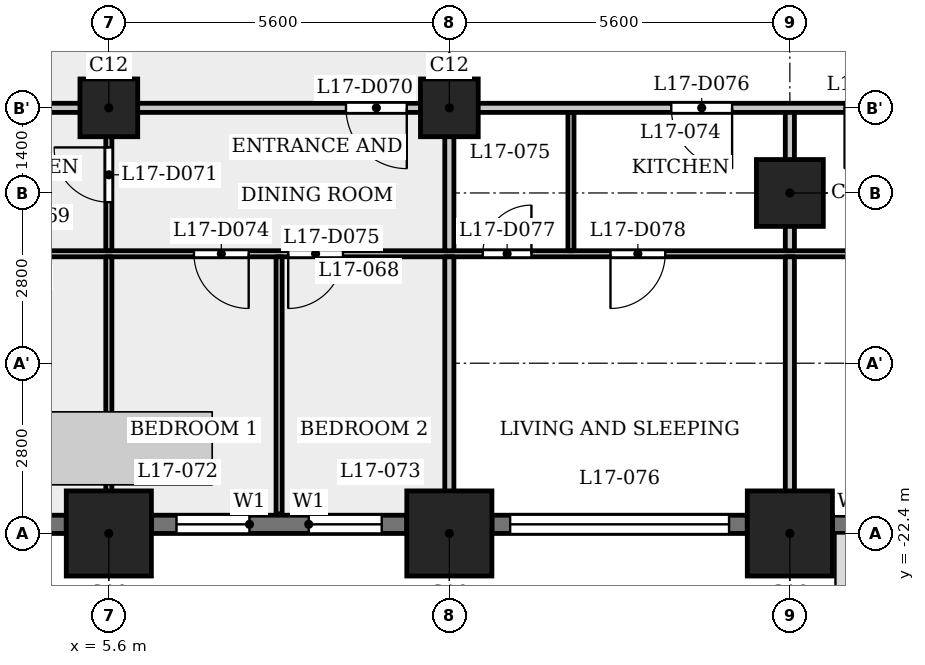
"""IFC4 building model, lengths in metres.
Left out: names, types, materials, properties, quantities, classifications, styles, units other than length and angle.
Written with IfcOpenShell. Run it as: python <this file> out.ifc"""

import sys

from ifc_helpers import new_model, si_unit, direction, frame, frame_2d, origin, origin_2d, place, context, subcontext, project, spatial, rectangle, extrude, element, fill, save


model = new_model("IFC4")
c1 = context("Model", 3, precision=1e-05, world=origin(), true_north=direction((0.0, 1.0)))
c2 = subcontext(c1, "Body", "Model", "MODEL_VIEW")
j1 = project(units=[si_unit("LENGTHUNIT", "METRE"), si_unit("PLANEANGLEUNIT", "RADIAN")], contexts=[c1])
p1 = place(None, origin())
s1 = spatial("IfcSite", under=j1, at=p1, CompositionType="ELEMENT")
p2 = place(p1, origin())
s2 = spatial("IfcBuilding", under=s1, at=p2, CompositionType="ELEMENT")
p3 = place(p2, frame((0.0, 0.0, 69.0)))
s3 = spatial("IfcBuildingStorey", under=s2, at=p3, CompositionType="ELEMENT", Elevation=69.0)
for number, where, z_axis, x_axis in (
    (1, (5.6, -22.4, 0.0), (0.0, 0.0, 1.0), (1.0, 0.0, 0.0)),
    (2, (11.2, -22.4, 0.0), (0.0, 0.0, 1.0), (1.0, 0.0, 0.0)),
    (3, (16.8, -22.4, 0.0), (0.0, 0.0, 1.0), (1.0, 0.0, 0.0)),
):
    element("IfcColumn", number, at=place(p3, frame(where, z_axis=z_axis, x_axis=x_axis)), inside=s3, PredefinedType="COLUMN", context=c2, shape_type="SweptSolid", body=[
        extrude(rectangle(XDim=1.4, YDim=1.4, at=origin_2d()), origin(), (0.0, 0.0, 1.0), 3.5),
    ])
p4 = place(p3, frame((16.8, -16.8, 0.0), z_axis=(0.0, 0.0, 1.0), x_axis=(1.0, 0.0, 0.0)))
e4 = element("IfcColumn", 4, at=p4, inside=s3, PredefinedType="COLUMN", context=c2, shape_type="SweptSolid", body=[
    extrude(rectangle(XDim=1.1, YDim=1.1, at=origin_2d()), origin(), (0.0, 0.0, 1.0), 3.5),
])
for number, where, z_axis, x_axis in (
    (5, (5.6, -15.4, 0.0), (0.0, 0.0, 1.0), (1.0, 0.0, 0.0)),
    (6, (11.2, -15.4, 0.0), (0.0, 0.0, 1.0), (1.0, 0.0, 0.0)),
):
    element("IfcColumn", number, at=place(p3, frame(where, z_axis=z_axis, x_axis=x_axis)), inside=s3, PredefinedType="COLUMN", context=c2, shape_type="SweptSolid", body=[
        extrude(rectangle(XDim=0.95, YDim=0.95, at=origin_2d()), origin(), (0.0, 0.0, 1.0), 3.5),
    ])
p5 = place(p3, frame((0.7, -22.25, 0.0), z_axis=(0.0, 0.0, 1.0), x_axis=(1.0, 0.0, 0.0)))
e7 = element("IfcWall", 7, at=p5, inside=s3, PredefinedType="SOLIDWALL", context=c2, shape_type="SweptSolid", body=[
    extrude(rectangle(XDim=4.2, YDim=0.3, at=frame_2d((2.1, 0.0))), origin(), (0.0, 0.0, 1.0), 2.3),
])
p6 = place(p5, frame((0.3, 0.0, 1.2)))
e8 = element("IfcOpeningElement", 8, at=p6, cuts=e7, PredefinedType="OPENING", context=c2, shape_type="SweptSolid", body=[
    extrude(rectangle(XDim=3.6, YDim=0.95, at=frame_2d((1.8, 0.475))), frame((0.0, 0.16, 0.0), z_axis=(0.0, -1.0, 0.0), x_axis=(1.0, 0.0, 0.0)), (0.0, 0.0, 1.0), 0.32),
])
p7 = place(p3, frame((6.3, -22.25, 0.0), z_axis=(0.0, 0.0, 1.0), x_axis=(1.0, 0.0, 0.0)))
e9 = element("IfcWall", 9, at=p7, inside=s3, PredefinedType="SOLIDWALL", context=c2, shape_type="SweptSolid", body=[
    extrude(rectangle(XDim=4.2, YDim=0.3, at=frame_2d((2.1, 0.0))), origin(), (0.0, 0.0, 1.0), 2.3),
])
p8 = place(p7, frame((0.413, 0.0, 0.6)))
e10 = element("IfcOpeningElement", 10, at=p8, cuts=e9, PredefinedType="OPENING", context=c2, shape_type="SweptSolid", body=[
    extrude(rectangle(XDim=1.2, YDim=1.55, at=frame_2d((0.6, 0.775))), frame((0.0, 0.16, 0.0), z_axis=(0.0, -1.0, 0.0), x_axis=(1.0, 0.0, 0.0)), (0.0, 0.0, 1.0), 0.32),
])
p9 = place(p7, frame((2.587, 0.0, 0.6)))
e11 = element("IfcOpeningElement", 11, at=p9, cuts=e9, PredefinedType="OPENING", context=c2, shape_type="SweptSolid", body=[
    extrude(rectangle(XDim=1.2, YDim=1.55, at=frame_2d((0.6, 0.775))), frame((0.0, 0.16, 0.0), z_axis=(0.0, -1.0, 0.0), x_axis=(1.0, 0.0, 0.0)), (0.0, 0.0, 1.0), 0.32),
])
p10 = place(p3, frame((11.9, -22.25, 0.0), z_axis=(0.0, 0.0, 1.0), x_axis=(1.0, 0.0, 0.0)))
e12 = element("IfcWall", 12, at=p10, inside=s3, PredefinedType="SOLIDWALL", context=c2, shape_type="SweptSolid", body=[
    extrude(rectangle(XDim=4.2, YDim=0.3, at=frame_2d((2.1, 0.0))), origin(), (0.0, 0.0, 1.0), 2.3),
])
p11 = place(p10, frame((0.3, 0.0, 1.2)))
e13 = element("IfcOpeningElement", 13, at=p11, cuts=e12, PredefinedType="OPENING", context=c2, shape_type="SweptSolid", body=[
    extrude(rectangle(XDim=3.6, YDim=0.95, at=frame_2d((1.8, 0.475))), frame((0.0, 0.16, 0.0), z_axis=(0.0, -1.0, 0.0), x_axis=(1.0, 0.0, 0.0)), (0.0, 0.0, 1.0), 0.32),
])
p12 = place(p3, frame((17.5, -22.25, 0.0), z_axis=(0.0, 0.0, 1.0), x_axis=(1.0, 0.0, 0.0)))
e14 = element("IfcWall", 14, at=p12, inside=s3, PredefinedType="SOLIDWALL", context=c2, shape_type="SweptSolid", body=[
    extrude(rectangle(XDim=2.5, YDim=0.3, at=frame_2d((1.25, 0.0))), origin(), (0.0, 0.0, 1.0), 2.3),
])
p13 = place(p12, frame((0.35, 0.0, 0.9)))
e15 = element("IfcOpeningElement", 15, at=p13, cuts=e14, PredefinedType="OPENING", context=c2, shape_type="SweptSolid", body=[
    extrude(rectangle(XDim=1.8, YDim=1.25, at=frame_2d((0.9, 0.625))), frame((0.0, 0.16, 0.0), z_axis=(0.0, -1.0, 0.0), x_axis=(1.0, 0.0, 0.0)), (0.0, 0.0, 1.0), 0.32),
])
p14 = place(p3, frame((-26.394, -17.8, 0.0), z_axis=(0.0, 0.0, 1.0), x_axis=(1.0, 0.0, 0.0)))
e16 = element("IfcWall", 16, at=p14, inside=s3, PredefinedType="PARTITIONING", context=c2, shape_type="SweptSolid", body=[
    extrude(rectangle(XDim=53.034, YDim=0.1, at=frame_2d((26.517, 0.0))), origin(), (0.0, 0.0, 1.0), 3.15),
])
p15 = place(p14, frame((0.794, 0.0, 0.0)))
e17 = element("IfcOpeningElement", 17, at=p15, cuts=e16, PredefinedType="OPENING", context=c2, shape_type="SweptSolid", body=[
    extrude(rectangle(XDim=0.8, YDim=2.1, at=frame_2d((0.4, 1.05))), frame((0.0, 0.06, 0.0), z_axis=(0.0, -1.0, 0.0), x_axis=(1.0, 0.0, 0.0)), (0.0, 0.0, 1.0), 0.12),
])
p16 = place(p14, frame((5.644, 0.0, 0.0)))
e18 = element("IfcOpeningElement", 18, at=p16, cuts=e16, PredefinedType="OPENING", context=c2, shape_type="SweptSolid", body=[
    extrude(rectangle(XDim=0.9, YDim=2.1, at=frame_2d((0.45, 1.05))), frame((0.0, 0.06, 0.0), z_axis=(0.0, -1.0, 0.0), x_axis=(1.0, 0.0, 0.0)), (0.0, 0.0, 1.0), 0.12),
])
p17 = place(p14, frame((10.494, 0.0, 0.0)))
e19 = element("IfcOpeningElement", 19, at=p17, cuts=e16, PredefinedType="OPENING", context=c2, shape_type="SweptSolid", body=[
    extrude(rectangle(XDim=0.8, YDim=2.1, at=frame_2d((0.4, 1.05))), frame((0.0, 0.06, 0.0), z_axis=(0.0, -1.0, 0.0), x_axis=(1.0, 0.0, 0.0)), (0.0, 0.0, 1.0), 0.12),
])
p18 = place(p14, frame((13.844, 0.0, 0.0)))
e20 = element("IfcOpeningElement", 20, at=p18, cuts=e16, PredefinedType="OPENING", context=c2, shape_type="SweptSolid", body=[
    extrude(rectangle(XDim=0.9, YDim=2.1, at=frame_2d((0.45, 1.05))), frame((0.0, 0.06, 0.0), z_axis=(0.0, -1.0, 0.0), x_axis=(1.0, 0.0, 0.0)), (0.0, 0.0, 1.0), 0.12),
])
p19 = place(p14, frame((19.344, 0.0, 0.0)))
e21 = element("IfcOpeningElement", 21, at=p19, cuts=e16, PredefinedType="OPENING", context=c2, shape_type="SweptSolid", body=[
    extrude(rectangle(XDim=0.8, YDim=2.1, at=frame_2d((0.4, 1.05))), frame((0.0, 0.06, 0.0), z_axis=(0.0, -1.0, 0.0), x_axis=(1.0, 0.0, 0.0)), (0.0, 0.0, 1.0), 0.12),
])
p20 = place(p14, frame((16.094, 0.0, 0.0)))
e22 = element("IfcOpeningElement", 22, at=p20, cuts=e16, PredefinedType="OPENING", context=c2, shape_type="SweptSolid", body=[
    extrude(rectangle(XDim=0.9, YDim=2.1, at=frame_2d((0.45, 1.05))), frame((0.0, 0.06, 0.0), z_axis=(0.0, -1.0, 0.0), x_axis=(1.0, 0.0, 0.0)), (0.0, 0.0, 1.0), 0.12),
])
p21 = place(p14, frame((24.944, 0.0, 0.0)))
e23 = element("IfcOpeningElement", 23, at=p21, cuts=e16, PredefinedType="OPENING", context=c2, shape_type="SweptSolid", body=[
    extrude(rectangle(XDim=0.8, YDim=2.1, at=frame_2d((0.4, 1.05))), frame((0.0, 0.06, 0.0), z_axis=(0.0, -1.0, 0.0), x_axis=(1.0, 0.0, 0.0)), (0.0, 0.0, 1.0), 0.12),
])
p22 = place(p14, frame((22.444, 0.0, 0.0)))
e24 = element("IfcOpeningElement", 24, at=p22, cuts=e16, PredefinedType="OPENING", context=c2, shape_type="SweptSolid", body=[
    extrude(rectangle(XDim=0.9, YDim=2.1, at=frame_2d((0.45, 1.05))), frame((0.0, 0.06, 0.0), z_axis=(0.0, -1.0, 0.0), x_axis=(1.0, 0.0, 0.0)), (0.0, 0.0, 1.0), 0.12),
])
p23 = place(p14, frame((26.944, 0.0, 0.0)))
e25 = element("IfcOpeningElement", 25, at=p23, cuts=e16, PredefinedType="OPENING", context=c2, shape_type="SweptSolid", body=[
    extrude(rectangle(XDim=0.8, YDim=2.1, at=frame_2d((0.4, 1.05))), frame((0.0, 0.06, 0.0), z_axis=(0.0, -1.0, 0.0), x_axis=(1.0, 0.0, 0.0)), (0.0, 0.0, 1.0), 0.12),
])
p24 = place(p14, frame((29.794, 0.0, 0.0)))
e26 = element("IfcOpeningElement", 26, at=p24, cuts=e16, PredefinedType="OPENING", context=c2, shape_type="SweptSolid", body=[
    extrude(rectangle(XDim=0.9, YDim=2.1, at=frame_2d((0.45, 1.05))), frame((0.0, 0.06, 0.0), z_axis=(0.0, -1.0, 0.0), x_axis=(1.0, 0.0, 0.0)), (0.0, 0.0, 1.0), 0.12),
])
p25 = place(p14, frame((33.394, 0.0, 0.0)))
e27 = element("IfcOpeningElement", 27, at=p25, cuts=e16, PredefinedType="OPENING", context=c2, shape_type="SweptSolid", body=[
    extrude(rectangle(XDim=0.9, YDim=2.1, at=frame_2d((0.45, 1.05))), frame((0.0, 0.06, 0.0), z_axis=(0.0, -1.0, 0.0), x_axis=(1.0, 0.0, 0.0)), (0.0, 0.0, 1.0), 0.12),
])
p26 = place(p14, frame((34.944, 0.0, 0.0)))
e28 = element("IfcOpeningElement", 28, at=p26, cuts=e16, PredefinedType="OPENING", context=c2, shape_type="SweptSolid", body=[
    extrude(rectangle(XDim=0.9, YDim=2.1, at=frame_2d((0.45, 1.05))), frame((0.0, 0.06, 0.0), z_axis=(0.0, -1.0, 0.0), x_axis=(1.0, 0.0, 0.0)), (0.0, 0.0, 1.0), 0.12),
])
p27 = place(p14, frame((38.144, 0.0, 0.0)))
e29 = element("IfcOpeningElement", 29, at=p27, cuts=e16, PredefinedType="OPENING", context=c2, shape_type="SweptSolid", body=[
    extrude(rectangle(XDim=0.8, YDim=2.1, at=frame_2d((0.4, 1.05))), frame((0.0, 0.06, 0.0), z_axis=(0.0, -1.0, 0.0), x_axis=(1.0, 0.0, 0.0)), (0.0, 0.0, 1.0), 0.12),
])
p28 = place(p14, frame((40.244, 0.0, 0.0)))
e30 = element("IfcOpeningElement", 30, at=p28, cuts=e16, PredefinedType="OPENING", context=c2, shape_type="SweptSolid", body=[
    extrude(rectangle(XDim=0.9, YDim=2.1, at=frame_2d((0.45, 1.05))), frame((0.0, 0.06, 0.0), z_axis=(0.0, -1.0, 0.0), x_axis=(1.0, 0.0, 0.0)), (0.0, 0.0, 1.0), 0.12),
])
p29 = place(p14, frame((49.362, 0.0, 0.0)))
e31 = element("IfcOpeningElement", 31, at=p29, cuts=e16, PredefinedType="OPENING", context=c2, shape_type="SweptSolid", body=[
    extrude(rectangle(XDim=0.8, YDim=2.1, at=frame_2d((0.4, 1.05))), frame((0.0, 0.06, 0.0), z_axis=(0.0, -1.0, 0.0), x_axis=(1.0, 0.0, 0.0)), (0.0, 0.0, 1.0), 0.12),
])
p30 = place(p14, frame((45.094, 0.0, 0.0)))
e32 = element("IfcOpeningElement", 32, at=p30, cuts=e16, PredefinedType="OPENING", context=c2, shape_type="SweptSolid", body=[
    extrude(rectangle(XDim=0.9, YDim=2.1, at=frame_2d((0.45, 1.05))), frame((0.0, 0.06, 0.0), z_axis=(0.0, -1.0, 0.0), x_axis=(1.0, 0.0, 0.0)), (0.0, 0.0, 1.0), 0.12),
])
p31 = place(p3, frame((-27.484, -15.4, 0.0), z_axis=(0.0, 0.0, 1.0), x_axis=(1.0, 0.0, 0.0)))
e33 = element("IfcWall", 33, at=p31, inside=s3, PredefinedType="PARTITIONING", context=c2, shape_type="SweptSolid", body=[
    extrude(rectangle(XDim=54.968, YDim=0.15, at=frame_2d((27.484, 0.0))), origin(), (0.0, 0.0, 1.0), 3.15),
])
p32 = place(p31, frame((5.734, 0.0, 0.0)))
e34 = element("IfcOpeningElement", 34, at=p32, cuts=e33, PredefinedType="OPENING", context=c2, shape_type="SweptSolid", body=[
    extrude(rectangle(XDim=1.0, YDim=2.1, at=frame_2d((0.5, 1.05))), frame((0.0, 0.085, 0.0), z_axis=(0.0, -1.0, 0.0), x_axis=(1.0, 0.0, 0.0)), (0.0, 0.0, 1.0), 0.17),
])
p33 = place(p31, frame((13.934, 0.0, 0.0)))
e35 = element("IfcOpeningElement", 35, at=p33, cuts=e33, PredefinedType="OPENING", context=c2, shape_type="SweptSolid", body=[
    extrude(rectangle(XDim=1.0, YDim=2.1, at=frame_2d((0.5, 1.05))), frame((0.0, 0.085, 0.0), z_axis=(0.0, -1.0, 0.0), x_axis=(1.0, 0.0, 0.0)), (0.0, 0.0, 1.0), 0.17),
])
p34 = place(p31, frame((18.184, 0.0, 0.0)))
e36 = element("IfcOpeningElement", 36, at=p34, cuts=e33, PredefinedType="OPENING", context=c2, shape_type="SweptSolid", body=[
    extrude(rectangle(XDim=1.0, YDim=2.1, at=frame_2d((0.5, 1.05))), frame((0.0, 0.085, 0.0), z_axis=(0.0, -1.0, 0.0), x_axis=(1.0, 0.0, 0.0)), (0.0, 0.0, 1.0), 0.17),
])
p35 = place(p31, frame((22.534, 0.0, 0.0)))
e37 = element("IfcOpeningElement", 37, at=p35, cuts=e33, PredefinedType="OPENING", context=c2, shape_type="SweptSolid", body=[
    extrude(rectangle(XDim=1.0, YDim=2.1, at=frame_2d((0.5, 1.05))), frame((0.0, 0.085, 0.0), z_axis=(0.0, -1.0, 0.0), x_axis=(1.0, 0.0, 0.0)), (0.0, 0.0, 1.0), 0.17),
])
p36 = place(p31, frame((36.984, 0.0, 0.0)))
e38 = element("IfcOpeningElement", 38, at=p36, cuts=e33, PredefinedType="OPENING", context=c2, shape_type="SweptSolid", body=[
    extrude(rectangle(XDim=1.0, YDim=2.1, at=frame_2d((0.5, 1.05))), frame((0.0, 0.085, 0.0), z_axis=(0.0, -1.0, 0.0), x_axis=(1.0, 0.0, 0.0)), (0.0, 0.0, 1.0), 0.17),
])
p37 = place(p31, frame((42.334, 0.0, 0.0)))
e39 = element("IfcOpeningElement", 39, at=p37, cuts=e33, PredefinedType="OPENING", context=c2, shape_type="SweptSolid", body=[
    extrude(rectangle(XDim=1.0, YDim=2.1, at=frame_2d((0.5, 1.05))), frame((0.0, 0.085, 0.0), z_axis=(0.0, -1.0, 0.0), x_axis=(1.0, 0.0, 0.0)), (0.0, 0.0, 1.0), 0.17),
])
p38 = place(p31, frame((45.184, 0.0, 0.0)))
e40 = element("IfcOpeningElement", 40, at=p38, cuts=e33, PredefinedType="OPENING", context=c2, shape_type="SweptSolid", body=[
    extrude(rectangle(XDim=1.0, YDim=2.1, at=frame_2d((0.5, 1.05))), frame((0.0, 0.085, 0.0), z_axis=(0.0, -1.0, 0.0), x_axis=(1.0, 0.0, 0.0)), (0.0, 0.0, 1.0), 0.17),
])
p39 = place(p3, frame((5.6, -23.08, 0.0), z_axis=(0.0, 0.0, 1.0), x_axis=(0.0, 1.0, 0.0)))
e41 = element("IfcWall", 41, at=p39, inside=s3, PredefinedType="PARTITIONING", context=c2, shape_type="SweptSolid", body=[
    extrude(rectangle(XDim=5.23, YDim=0.1, at=frame_2d((2.615, 0.0))), origin(), (0.0, 0.0, 1.0), 3.15),
])
p40 = place(p3, frame((5.6, -17.75, 0.0), z_axis=(0.0, 0.0, 1.0), x_axis=(0.0, 1.0, 0.0)))
e42 = element("IfcWall", 42, at=p40, inside=s3, PredefinedType="PARTITIONING", context=c2, shape_type="SweptSolid", body=[
    extrude(rectangle(XDim=2.275, YDim=0.1, at=frame_2d((1.137, 0.0))), origin(), (0.0, 0.0, 1.0), 3.15),
])
p41 = place(p40, frame((0.799, 0.0, 0.0)))
e43 = element("IfcOpeningElement", 43, at=p41, cuts=e42, PredefinedType="OPENING", context=c2, shape_type="SweptSolid", body=[
    extrude(rectangle(XDim=0.9, YDim=2.1, at=frame_2d((0.45, 1.05))), frame((0.0, 0.06, 0.0), z_axis=(0.0, -1.0, 0.0), x_axis=(1.0, 0.0, 0.0)), (0.0, 0.0, 1.0), 0.12),
])
p42 = place(p3, frame((8.4, -22.08, 0.0), z_axis=(0.0, 0.0, 1.0), x_axis=(0.0, 1.0, 0.0)))
e44 = element("IfcWall", 44, at=p42, inside=s3, PredefinedType="PARTITIONING", context=c2, shape_type="SweptSolid", body=[
    extrude(rectangle(XDim=4.23, YDim=0.1, at=frame_2d((2.115, 0.0))), origin(), (0.0, 0.0, 1.0), 3.15),
])
p43 = place(p3, frame((11.2, -23.08, 0.0), z_axis=(0.0, 0.0, 1.0), x_axis=(0.0, 1.0, 0.0)))
e45 = element("IfcWall", 45, at=p43, inside=s3, PredefinedType="PARTITIONING", context=c2, shape_type="SweptSolid", body=[
    extrude(rectangle(XDim=5.23, YDim=0.15, at=frame_2d((2.615, 0.0))), origin(), (0.0, 0.0, 1.0), 3.15),
])
p44 = place(p3, frame((11.2, -17.75, 0.0), z_axis=(0.0, 0.0, 1.0), x_axis=(0.0, 1.0, 0.0)))
e46 = element("IfcWall", 46, at=p44, inside=s3, PredefinedType="PARTITIONING", context=c2, shape_type="SweptSolid", body=[
    extrude(rectangle(XDim=2.275, YDim=0.15, at=frame_2d((1.137, 0.0))), origin(), (0.0, 0.0, 1.0), 3.15),
])
p45 = place(p3, frame((13.2, -17.75, 0.0), z_axis=(0.0, 0.0, 1.0), x_axis=(0.0, 1.0, 0.0)))
e47 = element("IfcWall", 47, at=p45, inside=s3, PredefinedType="PARTITIONING", context=c2, shape_type="SweptSolid", body=[
    extrude(rectangle(XDim=2.275, YDim=0.1, at=frame_2d((1.137, 0.0))), origin(), (0.0, 0.0, 1.0), 3.15),
])
p46 = place(p3, frame((16.8, -23.08, 0.0), z_axis=(0.0, 0.0, 1.0), x_axis=(0.0, 1.0, 0.0)))
e48 = element("IfcWall", 48, at=p46, inside=s3, PredefinedType="PARTITIONING", context=c2, shape_type="SweptSolid", body=[
    extrude(rectangle(XDim=5.23, YDim=0.15, at=frame_2d((2.615, 0.0))), origin(), (0.0, 0.0, 1.0), 3.15),
])
p47 = place(p3, frame((16.8, -17.75, 0.0), z_axis=(0.0, 0.0, 1.0), x_axis=(0.0, 1.0, 0.0)))
e49 = element("IfcWall", 49, at=p47, inside=s3, PredefinedType="PARTITIONING", context=c2, shape_type="SweptSolid", body=[
    extrude(rectangle(XDim=2.275, YDim=0.15, at=frame_2d((1.137, 0.0))), origin(), (0.0, 0.0, 1.0), 3.15),
])
p48 = place(p36, origin())
e50 = element("IfcDoor", 50, at=p48, inside=s3, OperationType="SINGLE_SWING_RIGHT", PredefinedType="DOOR", context=c2, shape_type="SweptSolid", body=[
    extrude(rectangle(XDim=1.0, YDim=2.1, at=frame_2d((0.5, 1.05))), frame((0.0, 0.025, 0.0), z_axis=(0.0, -1.0, 0.0), x_axis=(1.0, 0.0, 0.0)), (0.0, 0.0, 1.0), 0.05),
])
fill(e38, e50)
p49 = place(p41, origin())
e51 = element("IfcDoor", 51, at=p49, inside=s3, OperationType="SINGLE_SWING_LEFT", PredefinedType="DOOR", context=c2, shape_type="SweptSolid", body=[
    extrude(rectangle(XDim=0.9, YDim=2.1, at=frame_2d((0.45, 1.05))), frame((0.0, 0.025, 0.0), z_axis=(0.0, -1.0, 0.0), x_axis=(1.0, 0.0, 0.0)), (0.0, 0.0, 1.0), 0.05),
])
fill(e43, e51)
p50 = place(p25, origin())
e52 = element("IfcDoor", 52, at=p50, inside=s3, OperationType="SINGLE_SWING_RIGHT", PredefinedType="DOOR", context=c2, shape_type="SweptSolid", body=[
    extrude(rectangle(XDim=0.9, YDim=2.1, at=frame_2d((0.45, 1.05))), frame((0.0, 0.025, 0.0), z_axis=(0.0, -1.0, 0.0), x_axis=(1.0, 0.0, 0.0)), (0.0, 0.0, 1.0), 0.05),
])
fill(e27, e52)
p51 = place(p26, origin())
e53 = element("IfcDoor", 53, at=p51, inside=s3, OperationType="SINGLE_SWING_LEFT", PredefinedType="DOOR", context=c2, shape_type="SweptSolid", body=[
    extrude(rectangle(XDim=0.9, YDim=2.1, at=frame_2d((0.45, 1.05))), frame((0.0, 0.025, 0.0), z_axis=(0.0, -1.0, 0.0), x_axis=(1.0, 0.0, 0.0)), (0.0, 0.0, 1.0), 0.05),
])
fill(e28, e53)
p52 = place(p37, origin())
e54 = element("IfcDoor", 54, at=p52, inside=s3, OperationType="SINGLE_SWING_RIGHT", PredefinedType="DOOR", context=c2, shape_type="SweptSolid", body=[
    extrude(rectangle(XDim=1.0, YDim=2.1, at=frame_2d((0.5, 1.05))), frame((0.0, 0.025, 0.0), z_axis=(0.0, -1.0, 0.0), x_axis=(1.0, 0.0, 0.0)), (0.0, 0.0, 1.0), 0.05),
])
fill(e39, e54)
p53 = place(p27, origin())
e55 = element("IfcDoor", 55, at=p53, inside=s3, OperationType="SINGLE_SWING_LEFT", PredefinedType="DOOR", context=c2, shape_type="SweptSolid", body=[
    extrude(rectangle(XDim=0.8, YDim=2.1, at=frame_2d((0.4, 1.05))), frame((0.0, 0.025, 0.0), z_axis=(0.0, -1.0, 0.0), x_axis=(1.0, 0.0, 0.0)), (0.0, 0.0, 1.0), 0.05),
])
fill(e29, e55)
p54 = place(p28, origin())
e56 = element("IfcDoor", 56, at=p54, inside=s3, OperationType="SINGLE_SWING_LEFT", PredefinedType="DOOR", context=c2, shape_type="SweptSolid", body=[
    extrude(rectangle(XDim=0.9, YDim=2.1, at=frame_2d((0.45, 1.05))), frame((0.0, 0.025, 0.0), z_axis=(0.0, -1.0, 0.0), x_axis=(1.0, 0.0, 0.0)), (0.0, 0.0, 1.0), 0.05),
])
fill(e30, e56)
p55 = place(p38, origin())
e57 = element("IfcDoor", 57, at=p55, inside=s3, OperationType="SINGLE_SWING_LEFT", PredefinedType="DOOR", context=c2, shape_type="SweptSolid", body=[
    extrude(rectangle(XDim=1.0, YDim=2.1, at=frame_2d((0.5, 1.05))), frame((0.0, 0.025, 0.0), z_axis=(0.0, -1.0, 0.0), x_axis=(1.0, 0.0, 0.0)), (0.0, 0.0, 1.0), 0.05),
])
fill(e40, e57)
p56 = place(p8, origin())
e58 = element("IfcWindow", 58, at=p56, inside=s3, PartitioningType="SINGLE_PANEL", PredefinedType="WINDOW", context=c2, shape_type="SweptSolid", body=[
    extrude(rectangle(XDim=1.2, YDim=1.55, at=frame_2d((0.6, 0.775))), frame((0.0, 0.03, 0.0), z_axis=(0.0, -1.0, 0.0), x_axis=(1.0, 0.0, 0.0)), (0.0, 0.0, 1.0), 0.06),
])
fill(e10, e58)
p57 = place(p9, origin())
e59 = element("IfcWindow", 59, at=p57, inside=s3, PartitioningType="SINGLE_PANEL", PredefinedType="WINDOW", context=c2, shape_type="SweptSolid", body=[
    extrude(rectangle(XDim=1.2, YDim=1.55, at=frame_2d((0.6, 0.775))), frame((0.0, 0.03, 0.0), z_axis=(0.0, -1.0, 0.0), x_axis=(1.0, 0.0, 0.0)), (0.0, 0.0, 1.0), 0.06),
])
fill(e11, e59)
p58 = place(p11, origin())
e60 = element("IfcWindow", 60, at=p58, inside=s3, PartitioningType="SINGLE_PANEL", PredefinedType="WINDOW", context=c2, shape_type="SweptSolid", body=[
    extrude(rectangle(XDim=3.6, YDim=0.95, at=frame_2d((1.8, 0.475))), frame((0.0, 0.03, 0.0), z_axis=(0.0, -1.0, 0.0), x_axis=(1.0, 0.0, 0.0)), (0.0, 0.0, 1.0), 0.06),
])
fill(e13, e60)
save(model, sys.argv[1])
